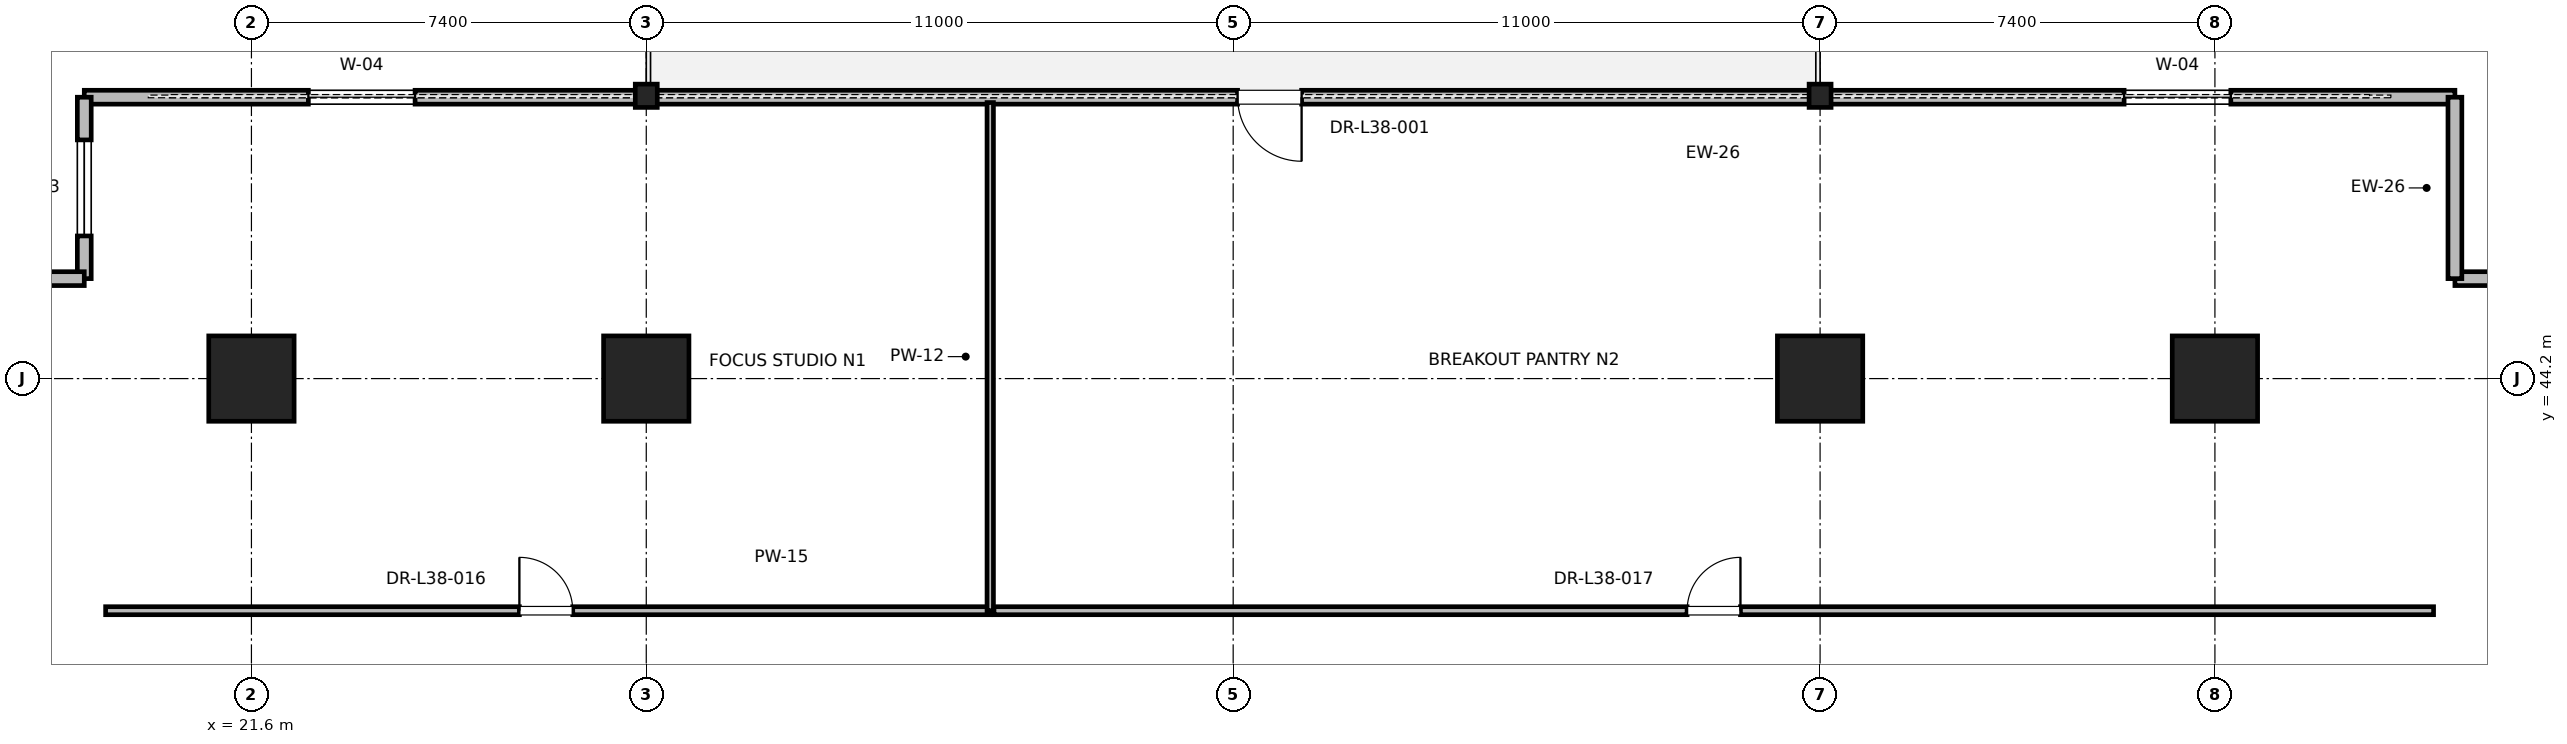
"""IFC4 building model, lengths in metres.
Left out: names, types, materials, properties, quantities, classifications, styles, units other than length and angle.
Written with IfcOpenShell. Run it as: python <this file> out.ifc"""

import sys

from ifc_helpers import new_model, si_unit, direction, frame, frame_2d, origin, origin_2d, place, context, subcontext, project, spatial, rectangle, i_section, extrude, element, fill, save


model = new_model("IFC4")
c1 = context("Model", 3, precision=1e-05, world=origin(), true_north=direction((0.0, 1.0)))
c2 = subcontext(c1, "Body", "Model", "MODEL_VIEW")
j1 = project(units=[si_unit("LENGTHUNIT", "METRE"), si_unit("PLANEANGLEUNIT", "RADIAN")], contexts=[c1])
p1 = place(None, origin())
s1 = spatial("IfcSite", under=j1, at=p1, CompositionType="ELEMENT")
p2 = place(p1, origin())
s2 = spatial("IfcBuilding", under=s1, at=p2, CompositionType="ELEMENT")
p3 = place(p2, frame((0.0, 0.0, 164.4)))
s3 = spatial("IfcBuildingStorey", under=s2, at=p3, CompositionType="ELEMENT", Elevation=164.4)
for number, where, z_axis, x_axis in (
    (1, (29.0, 44.2, 0.0), (0.0, 0.0, 1.0), (1.0, 0.0, 0.0)),
    (2, (51.0, 44.2, 0.0), (0.0, 0.0, 1.0), (1.0, 0.0, 0.0)),
    (3, (21.6, 44.2, 0.0), (0.0, 0.0, 1.0), (1.0, 0.0, 0.0)),
    (4, (58.4, 44.2, 0.0), (0.0, 0.0, 1.0), (1.0, 0.0, 0.0)),
):
    element("IfcColumn", number, at=place(p3, frame(where, z_axis=z_axis, x_axis=x_axis)), inside=s3, PredefinedType="COLUMN", context=c2, shape_type="SweptSolid", body=[
        extrude(rectangle(XDim=1.6, YDim=1.6, at=origin_2d()), origin(), (0.0, 0.0, 1.0), 4.0),
    ])
for number, where, z_axis, x_axis in (
    (5, (29.0, 49.5, 0.0), (0.0, 0.0, 1.0), (1.0, 0.0, 0.0)),
    (6, (51.0, 49.5, 0.0), (0.0, 0.0, 1.0), (1.0, 0.0, 0.0)),
):
    element("IfcColumn", number, at=place(p3, frame(where, z_axis=z_axis, x_axis=x_axis)), inside=s3, PredefinedType="COLUMN", context=c2, shape_type="SweptSolid", body=[
        extrude(i_section(OverallWidth=0.412, OverallDepth=0.437, WebThickness=0.036, FlangeThickness=0.058, FilletRadius=0.015, at=origin_2d()), origin(), (0.0, 0.0, 1.0), 4.0),
    ])
p4 = place(p3, frame((62.898, 49.473, 0.0), z_axis=(0.0, 0.0, 1.0), x_axis=(-1.0, 0.0, 0.0)))
e7 = element("IfcWall", 7, at=p4, inside=s3, PredefinedType="PARAPET", context=c2, shape_type="SweptSolid", body=[
    extrude(rectangle(XDim=44.431, YDim=0.26, at=frame_2d((22.215, 0.0))), origin(), (0.0, 0.0, 1.0), 2.97),
])
p5 = place(p4, frame((4.2, 0.0, 0.85)))
e8 = element("IfcOpeningElement", 8, at=p5, cuts=e7, PredefinedType="OPENING", context=c2, shape_type="SweptSolid", body=[
    extrude(rectangle(XDim=2.0, YDim=2.3, at=frame_2d((1.0, 1.15))), frame((0.0, 0.13, 0.0), z_axis=(0.0, -1.0, 0.0), x_axis=(1.0, 0.0, 0.0)), (0.0, 0.0, 1.0), 0.26),
])
p6 = place(p4, frame((21.615, 0.0, 0.0)))
e9 = element("IfcOpeningElement", 9, at=p6, cuts=e7, PredefinedType="OPENING", context=c2, shape_type="SweptSolid", body=[
    extrude(rectangle(XDim=1.2, YDim=2.2, at=frame_2d((0.6, 1.1))), frame((0.0, 0.13, 0.0), z_axis=(0.0, -1.0, 0.0), x_axis=(1.0, 0.0, 0.0)), (0.0, 0.0, 1.0), 0.26),
])
p7 = place(p4, frame((38.231, 0.0, 0.85)))
e10 = element("IfcOpeningElement", 10, at=p7, cuts=e7, PredefinedType="OPENING", context=c2, shape_type="SweptSolid", body=[
    extrude(rectangle(XDim=2.0, YDim=2.3, at=frame_2d((1.0, 1.15))), frame((0.0, 0.13, 0.0), z_axis=(0.0, -1.0, 0.0), x_axis=(1.0, 0.0, 0.0)), (0.0, 0.0, 1.0), 0.26),
])
p8 = place(p3, frame((66.698, 46.073, 0.0), z_axis=(0.0, 0.0, 1.0), x_axis=(-1.0, 0.0, 0.0)))
e11 = element("IfcWall", 11, at=p8, inside=s3, PredefinedType="PARAPET", context=c2, shape_type="SweptSolid", body=[
    extrude(rectangle(XDim=3.8, YDim=0.26, at=frame_2d((1.9, 0.0))), origin(), (0.0, 0.0, 1.0), 3.775),
])
p9 = place(p8, frame((1.0, 0.0, 0.85)))
e12 = element("IfcOpeningElement", 12, at=p9, cuts=e11, PredefinedType="OPENING", context=c2, shape_type="SweptSolid", body=[
    extrude(rectangle(XDim=1.8, YDim=2.2, at=frame_2d((0.9, 1.1))), frame((0.0, 0.13, 0.0), z_axis=(0.0, -1.0, 0.0), x_axis=(1.0, 0.0, 0.0)), (0.0, 0.0, 1.0), 0.26),
])
p10 = place(p3, frame((62.898, 46.073, 0.0), z_axis=(0.0, 0.0, 1.0), x_axis=(0.0, 1.0, 0.0)))
e13 = element("IfcWall", 13, at=p10, inside=s3, PredefinedType="PARAPET", context=c2, shape_type="SweptSolid", body=[
    extrude(rectangle(XDim=3.4, YDim=0.26, at=frame_2d((1.7, 0.0))), origin(), (0.0, 0.0, 1.0), 3.775),
])
p11 = place(p3, frame((18.467, 49.473, 0.0), z_axis=(0.0, 0.0, 1.0), x_axis=(0.0, -1.0, 0.0)))
e14 = element("IfcWall", 14, at=p11, inside=s3, PredefinedType="PARAPET", context=c2, shape_type="SweptSolid", body=[
    extrude(rectangle(XDim=3.4, YDim=0.26, at=frame_2d((1.7, 0.0))), origin(), (0.0, 0.0, 1.0), 3.775),
])
p12 = place(p11, frame((0.8, 0.0, 0.85)))
e15 = element("IfcOpeningElement", 15, at=p12, cuts=e14, PredefinedType="OPENING", context=c2, shape_type="SweptSolid", body=[
    extrude(rectangle(XDim=1.8, YDim=2.2, at=frame_2d((0.9, 1.1))), frame((0.0, 0.13, 0.0), z_axis=(0.0, -1.0, 0.0), x_axis=(1.0, 0.0, 0.0)), (0.0, 0.0, 1.0), 0.26),
])
p13 = place(p3, frame((18.467, 46.073, 0.0), z_axis=(0.0, 0.0, 1.0), x_axis=(-1.0, 0.0, 0.0)))
e16 = element("IfcWall", 16, at=p13, inside=s3, PredefinedType="PARAPET", context=c2, shape_type="SweptSolid", body=[
    extrude(rectangle(XDim=3.8, YDim=0.26, at=frame_2d((1.9, 0.0))), origin(), (0.0, 0.0, 1.0), 3.775),
])
p14 = place(p3, frame((18.867, 39.85, 0.0), z_axis=(0.0, 0.0, 1.0), x_axis=(1.0, 0.0, 0.0)))
e17 = element("IfcWall", 17, at=p14, inside=s3, PredefinedType="PARTITIONING", context=c2, shape_type="SweptSolid", body=[
    extrude(rectangle(XDim=16.58, YDim=0.15, at=frame_2d((8.29, 0.0))), origin(), (0.0, 0.0, 1.0), 2.85),
])
p15 = place(p14, frame((7.755, 0.0, 0.0)))
e18 = element("IfcOpeningElement", 18, at=p15, cuts=e17, PredefinedType="OPENING", context=c2, shape_type="SweptSolid", body=[
    extrude(rectangle(XDim=1.0, YDim=2.15, at=frame_2d((0.5, 1.075))), frame((0.0, 0.075, 0.0), z_axis=(0.0, -1.0, 0.0), x_axis=(1.0, 0.0, 0.0)), (0.0, 0.0, 1.0), 0.15),
])
p16 = place(p3, frame((35.447, 39.85, 0.0), z_axis=(0.0, 0.0, 1.0), x_axis=(0.0, 1.0, 0.0)))
e19 = element("IfcWall", 19, at=p16, inside=s3, PredefinedType="PARTITIONING", context=c2, shape_type="SweptSolid", body=[
    extrude(rectangle(XDim=9.523, YDim=0.12, at=frame_2d((4.761, 0.0))), origin(), (0.0, 0.0, 1.0), 2.405),
])
p17 = place(p3, frame((35.517, 39.85, 0.0), z_axis=(0.0, 0.0, 1.0), x_axis=(1.0, 0.0, 0.0)))
e20 = element("IfcWall", 20, at=p17, inside=s3, PredefinedType="PARTITIONING", context=c2, shape_type="SweptSolid", body=[
    extrude(rectangle(XDim=26.981, YDim=0.15, at=frame_2d((13.491, 0.0))), origin(), (0.0, 0.0, 1.0), 2.85),
])
p18 = place(p17, frame((12.99, 0.0, 0.0)))
e21 = element("IfcOpeningElement", 21, at=p18, cuts=e20, PredefinedType="OPENING", context=c2, shape_type="SweptSolid", body=[
    extrude(rectangle(XDim=1.0, YDim=2.15, at=frame_2d((0.5, 1.075))), frame((0.0, 0.075, 0.0), z_axis=(0.0, -1.0, 0.0), x_axis=(1.0, 0.0, 0.0)), (0.0, 0.0, 1.0), 0.15),
])
p19 = place(p5, origin())
e22 = element("IfcWindow", 22, at=p19, inside=s3, PartitioningType="SINGLE_PANEL", PredefinedType="WINDOW", context=c2, shape_type="SweptSolid", body=[
    extrude(rectangle(XDim=2.0, YDim=2.3, at=frame_2d((1.0, 1.15))), frame((0.0, 0.03, 0.0), z_axis=(0.0, -1.0, 0.0), x_axis=(1.0, 0.0, 0.0)), (0.0, 0.0, 1.0), 0.06),
])
fill(e8, e22)
p20 = place(p6, origin())
e23 = element("IfcDoor", 23, at=p20, inside=s3, OperationType="SINGLE_SWING_LEFT", PredefinedType="DOOR", context=c2, shape_type="SweptSolid", body=[
    extrude(rectangle(XDim=1.2, YDim=2.2, at=frame_2d((0.6, 1.1))), frame((0.0, 0.025, 0.0), z_axis=(0.0, -1.0, 0.0), x_axis=(1.0, 0.0, 0.0)), (0.0, 0.0, 1.0), 0.05),
])
fill(e9, e23)
p21 = place(p7, origin())
e24 = element("IfcWindow", 24, at=p21, inside=s3, PartitioningType="SINGLE_PANEL", PredefinedType="WINDOW", context=c2, shape_type="SweptSolid", body=[
    extrude(rectangle(XDim=2.0, YDim=2.3, at=frame_2d((1.0, 1.15))), frame((0.0, 0.03, 0.0), z_axis=(0.0, -1.0, 0.0), x_axis=(1.0, 0.0, 0.0)), (0.0, 0.0, 1.0), 0.06),
])
fill(e10, e24)
p22 = place(p12, origin())
e25 = element("IfcWindow", 25, at=p22, inside=s3, PartitioningType="SINGLE_PANEL", PredefinedType="WINDOW", context=c2, shape_type="SweptSolid", body=[
    extrude(rectangle(XDim=1.8, YDim=2.2, at=frame_2d((0.9, 1.1))), frame((0.0, 0.03, 0.0), z_axis=(0.0, -1.0, 0.0), x_axis=(1.0, 0.0, 0.0)), (0.0, 0.0, 1.0), 0.06),
])
fill(e15, e25)
p23 = place(p15, origin())
e26 = element("IfcDoor", 26, at=p23, inside=s3, OperationType="SINGLE_SWING_LEFT", PredefinedType="DOOR", context=c2, shape_type="SweptSolid", body=[
    extrude(rectangle(XDim=1.0, YDim=2.15, at=frame_2d((0.5, 1.075))), frame((0.0, 0.025, 0.0), z_axis=(0.0, -1.0, 0.0), x_axis=(1.0, 0.0, 0.0)), (0.0, 0.0, 1.0), 0.05),
])
fill(e18, e26)
p24 = place(p18, origin())
e27 = element("IfcDoor", 27, at=p24, inside=s3, OperationType="SINGLE_SWING_RIGHT", PredefinedType="DOOR", context=c2, shape_type="SweptSolid", body=[
    extrude(rectangle(XDim=1.0, YDim=2.15, at=frame_2d((0.5, 1.075))), frame((0.0, 0.025, 0.0), z_axis=(0.0, -1.0, 0.0), x_axis=(1.0, 0.0, 0.0)), (0.0, 0.0, 1.0), 0.05),
])
fill(e21, e27)
save(model, sys.argv[1])
